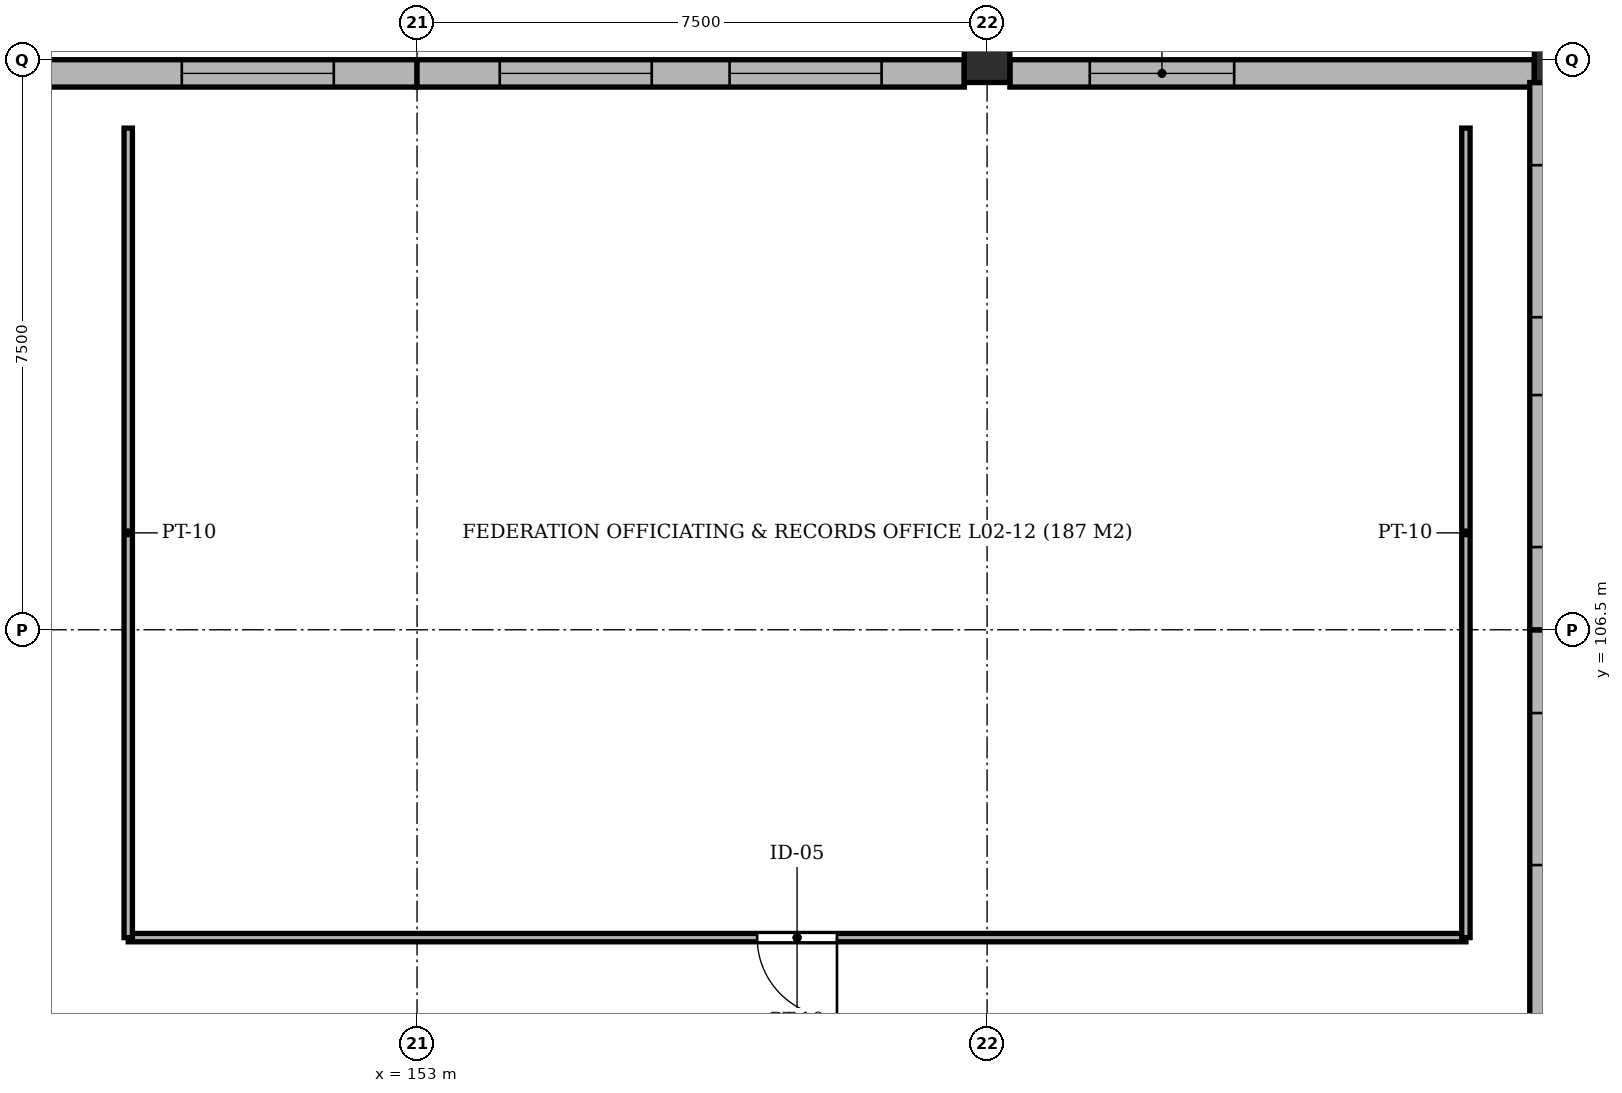
"""IFC4 building model, lengths in metres.
Left out: names, types, materials, properties, quantities, classifications, styles, units other than length and angle.
Written with IfcOpenShell. Run it as: python <this file> out.ifc"""

import sys

from ifc_helpers import new_model, si_unit, direction, frame, frame_2d, origin, origin_2d, place, context, subcontext, project, spatial, rectangle, extrude, element, fill, save


model = new_model("IFC4")
c1 = context("Model", 3, precision=1e-05, world=origin(), true_north=direction((0.0, 1.0)))
c2 = subcontext(c1, "Body", "Model", "MODEL_VIEW")
j1 = project(units=[si_unit("LENGTHUNIT", "METRE"), si_unit("PLANEANGLEUNIT", "RADIAN")], contexts=[c1])
p1 = place(None, origin())
s1 = spatial("IfcSite", under=j1, at=p1, CompositionType="ELEMENT")
p2 = place(p1, origin())
s2 = spatial("IfcBuilding", under=s1, at=p2, CompositionType="ELEMENT")
p3 = place(p2, frame((0.0, 0.0, 9.4)))
s3 = spatial("IfcBuildingStorey", under=s2, at=p3, CompositionType="ELEMENT", Elevation=9.4)
for number, where, z_axis, x_axis in (
    (1, (160.5, 114.0, -0.45), (0.0, 0.0, 1.0), (1.0, 0.0, 0.0)),
    (2, (168.0, 114.0, -0.45), (0.0, 0.0, 1.0), (1.0, 0.0, 0.0)),
):
    element("IfcColumn", number, at=place(p3, frame(where, z_axis=z_axis, x_axis=x_axis)), inside=s3, PredefinedType="COLUMN", context=c2, shape_type="SweptSolid", body=[
        extrude(rectangle(XDim=0.6, YDim=0.6, at=origin_2d()), origin(), (0.0, 0.0, 1.0), 4.77),
    ])
p4 = place(p3, frame((153.0, 113.82, 0.0), z_axis=(0.0, 0.0, 1.0), x_axis=(-1.0, 0.0, 0.0)))
e3 = element("IfcWall", 3, at=p4, inside=s3, PredefinedType="SOLIDWALL", context=c2, shape_type="SweptSolid", body=[
    extrude(rectangle(XDim=7.225, YDim=0.36, at=frame_2d((3.613, 0.0))), origin(), (0.0, 0.0, 1.0), 3.45),
])
p5 = place(p4, frame((1.095, 0.0, 0.92)))
e4 = element("IfcOpeningElement", 4, at=p5, cuts=e3, PredefinedType="OPENING", context=c2, shape_type="SweptSolid", body=[
    extrude(rectangle(XDim=2.0, YDim=2.1, at=frame_2d((1.0, 1.05))), frame((0.0, 0.192, 0.0), z_axis=(0.0, -1.0, 0.0), x_axis=(1.0, 0.0, 0.0)), (0.0, 0.0, 1.0), 0.384),
])
p6 = place(p3, frame((160.2, 113.82, 0.0), z_axis=(0.0, 0.0, 1.0), x_axis=(-1.0, 0.0, 0.0)))
e5 = element("IfcWall", 5, at=p6, inside=s3, PredefinedType="SOLIDWALL", context=c2, shape_type="SweptSolid", body=[
    extrude(rectangle(XDim=7.2, YDim=0.36, at=frame_2d((3.6, 0.0))), origin(), (0.0, 0.0, 1.0), 3.45),
])
p7 = place(p6, frame((4.112, 0.0, 0.92)))
e6 = element("IfcOpeningElement", 6, at=p7, cuts=e5, PredefinedType="OPENING", context=c2, shape_type="SweptSolid", body=[
    extrude(rectangle(XDim=2.0, YDim=2.1, at=frame_2d((1.0, 1.05))), frame((0.0, 0.192, 0.0), z_axis=(0.0, -1.0, 0.0), x_axis=(1.0, 0.0, 0.0)), (0.0, 0.0, 1.0), 0.384),
])
p8 = place(p6, frame((1.088, 0.0, 0.92)))
e7 = element("IfcOpeningElement", 7, at=p8, cuts=e5, PredefinedType="OPENING", context=c2, shape_type="SweptSolid", body=[
    extrude(rectangle(XDim=2.0, YDim=2.1, at=frame_2d((1.0, 1.05))), frame((0.0, 0.192, 0.0), z_axis=(0.0, -1.0, 0.0), x_axis=(1.0, 0.0, 0.0)), (0.0, 0.0, 1.0), 0.384),
])
p9 = place(p3, frame((167.7, 113.82, 0.0), z_axis=(0.0, 0.0, 1.0), x_axis=(-1.0, 0.0, 0.0)))
e8 = element("IfcWall", 8, at=p9, inside=s3, PredefinedType="SOLIDWALL", context=c2, shape_type="SweptSolid", body=[
    extrude(rectangle(XDim=6.9, YDim=0.36, at=frame_2d((3.45, 0.0))), origin(), (0.0, 0.0, 1.0), 3.82),
])
p10 = place(p9, frame((3.949, 0.0, 0.92)))
e9 = element("IfcOpeningElement", 9, at=p10, cuts=e8, PredefinedType="OPENING", context=c2, shape_type="SweptSolid", body=[
    extrude(rectangle(XDim=1.9, YDim=2.1, at=frame_2d((0.95, 1.05))), frame((0.0, 0.192, 0.0), z_axis=(0.0, -1.0, 0.0), x_axis=(1.0, 0.0, 0.0)), (0.0, 0.0, 1.0), 0.384),
])
p11 = place(p3, frame((167.82, 99.275, 0.0), z_axis=(0.0, 0.0, 1.0), x_axis=(0.0, 1.0, 0.0)))
e10 = element("IfcWall", 10, at=p11, inside=s3, PredefinedType="SOLIDWALL", context=c2, shape_type="SweptSolid", body=[
    extrude(rectangle(XDim=7.225, YDim=0.36, at=frame_2d((3.613, 0.0))), origin(), (0.0, 0.0, 1.0), 3.45),
])
p12 = place(p11, frame((4.13, 0.0, 0.92)))
e11 = element("IfcOpeningElement", 11, at=p12, cuts=e10, PredefinedType="OPENING", context=c2, shape_type="SweptSolid", body=[
    extrude(rectangle(XDim=2.0, YDim=2.1, at=frame_2d((1.0, 1.05))), frame((0.0, 0.192, 0.0), z_axis=(0.0, -1.0, 0.0), x_axis=(1.0, 0.0, 0.0)), (0.0, 0.0, 1.0), 0.384),
])
p13 = place(p3, frame((167.82, 106.5, 0.0), z_axis=(0.0, 0.0, 1.0), x_axis=(0.0, 1.0, 0.0)))
e12 = element("IfcWall", 12, at=p13, inside=s3, PredefinedType="SOLIDWALL", context=c2, shape_type="SweptSolid", body=[
    extrude(rectangle(XDim=7.2, YDim=0.36, at=frame_2d((3.6, 0.0))), origin(), (0.0, 0.0, 1.0), 3.45),
])
p14 = place(p13, frame((1.088, 0.0, 0.92)))
e13 = element("IfcOpeningElement", 13, at=p14, cuts=e12, PredefinedType="OPENING", context=c2, shape_type="SweptSolid", body=[
    extrude(rectangle(XDim=2.0, YDim=2.1, at=frame_2d((1.0, 1.05))), frame((0.0, 0.192, 0.0), z_axis=(0.0, -1.0, 0.0), x_axis=(1.0, 0.0, 0.0)), (0.0, 0.0, 1.0), 0.384),
])
p15 = place(p13, frame((4.112, 0.0, 0.92)))
e14 = element("IfcOpeningElement", 14, at=p15, cuts=e12, PredefinedType="OPENING", context=c2, shape_type="SweptSolid", body=[
    extrude(rectangle(XDim=2.0, YDim=2.1, at=frame_2d((1.0, 1.05))), frame((0.0, 0.192, 0.0), z_axis=(0.0, -1.0, 0.0), x_axis=(1.0, 0.0, 0.0)), (0.0, 0.0, 1.0), 0.384),
])
p16 = place(p3, frame((149.2, 102.45, 0.0), z_axis=(0.0, 0.0, 1.0), x_axis=(1.0, 0.0, 0.0)))
e15 = element("IfcWall", 15, at=p16, inside=s3, PredefinedType="PARTITIONING", context=c2, shape_type="SweptSolid", body=[
    extrude(rectangle(XDim=17.6, YDim=0.11, at=frame_2d((8.8, 0.0))), origin(), (0.0, 0.0, 1.0), 3.88),
])
p17 = place(p16, frame((8.275, 0.0, 0.0)))
e16 = element("IfcOpeningElement", 16, at=p17, cuts=e15, PredefinedType="OPENING", context=c2, shape_type="SweptSolid", body=[
    extrude(rectangle(XDim=1.05, YDim=2.15, at=frame_2d((0.525, 1.075))), frame((0.0, 0.067, 0.0), z_axis=(0.0, -1.0, 0.0), x_axis=(1.0, 0.0, 0.0)), (0.0, 0.0, 1.0), 0.134),
])
for number, where, z_axis, x_axis in (
    (17, (149.2, 102.45, 0.0), (0.0, 0.0, 1.0), (0.0, 1.0, 0.0)),
    (18, (166.8, 102.45, 0.0), (0.0, 0.0, 1.0), (0.0, 1.0, 0.0)),
):
    element("IfcWall", number, at=place(p3, frame(where, z_axis=z_axis, x_axis=x_axis)), inside=s3, PredefinedType="PARTITIONING", context=c2, shape_type="SweptSolid", body=[
        extrude(rectangle(XDim=10.65, YDim=0.11, at=frame_2d((5.325, 0.0))), origin(), (0.0, 0.0, 1.0), 3.88),
    ])
p18 = place(p5, origin())
e19 = element("IfcWindow", 19, at=p18, inside=s3, PartitioningType="SINGLE_PANEL", PredefinedType="WINDOW", context=c2, shape_type="SweptSolid", body=[
    extrude(rectangle(XDim=2.0, YDim=2.1, at=frame_2d((1.0, 1.05))), frame((0.0, 0.03, 0.0), z_axis=(0.0, -1.0, 0.0), x_axis=(1.0, 0.0, 0.0)), (0.0, 0.0, 1.0), 0.06),
])
fill(e4, e19)
p19 = place(p7, origin())
e20 = element("IfcWindow", 20, at=p19, inside=s3, PartitioningType="SINGLE_PANEL", PredefinedType="WINDOW", context=c2, shape_type="SweptSolid", body=[
    extrude(rectangle(XDim=2.0, YDim=2.1, at=frame_2d((1.0, 1.05))), frame((0.0, 0.03, 0.0), z_axis=(0.0, -1.0, 0.0), x_axis=(1.0, 0.0, 0.0)), (0.0, 0.0, 1.0), 0.06),
])
fill(e6, e20)
p20 = place(p8, origin())
e21 = element("IfcWindow", 21, at=p20, inside=s3, PartitioningType="SINGLE_PANEL", PredefinedType="WINDOW", context=c2, shape_type="SweptSolid", body=[
    extrude(rectangle(XDim=2.0, YDim=2.1, at=frame_2d((1.0, 1.05))), frame((0.0, 0.03, 0.0), z_axis=(0.0, -1.0, 0.0), x_axis=(1.0, 0.0, 0.0)), (0.0, 0.0, 1.0), 0.06),
])
fill(e7, e21)
p21 = place(p10, origin())
e22 = element("IfcWindow", 22, at=p21, inside=s3, PartitioningType="SINGLE_PANEL", PredefinedType="WINDOW", context=c2, shape_type="SweptSolid", body=[
    extrude(rectangle(XDim=1.9, YDim=2.1, at=frame_2d((0.95, 1.05))), frame((0.0, 0.03, 0.0), z_axis=(0.0, -1.0, 0.0), x_axis=(1.0, 0.0, 0.0)), (0.0, 0.0, 1.0), 0.06),
])
fill(e9, e22)
p22 = place(p12, origin())
e23 = element("IfcWindow", 23, at=p22, inside=s3, PartitioningType="SINGLE_PANEL", PredefinedType="WINDOW", context=c2, shape_type="SweptSolid", body=[
    extrude(rectangle(XDim=2.0, YDim=2.1, at=frame_2d((1.0, 1.05))), frame((0.0, 0.03, 0.0), z_axis=(0.0, -1.0, 0.0), x_axis=(1.0, 0.0, 0.0)), (0.0, 0.0, 1.0), 0.06),
])
fill(e11, e23)
p23 = place(p14, origin())
e24 = element("IfcWindow", 24, at=p23, inside=s3, PartitioningType="SINGLE_PANEL", PredefinedType="WINDOW", context=c2, shape_type="SweptSolid", body=[
    extrude(rectangle(XDim=2.0, YDim=2.1, at=frame_2d((1.0, 1.05))), frame((0.0, 0.03, 0.0), z_axis=(0.0, -1.0, 0.0), x_axis=(1.0, 0.0, 0.0)), (0.0, 0.0, 1.0), 0.06),
])
fill(e13, e24)
p24 = place(p15, origin())
e25 = element("IfcWindow", 25, at=p24, inside=s3, PartitioningType="SINGLE_PANEL", PredefinedType="WINDOW", context=c2, shape_type="SweptSolid", body=[
    extrude(rectangle(XDim=2.0, YDim=2.1, at=frame_2d((1.0, 1.05))), frame((0.0, 0.03, 0.0), z_axis=(0.0, -1.0, 0.0), x_axis=(1.0, 0.0, 0.0)), (0.0, 0.0, 1.0), 0.06),
])
fill(e14, e25)
p25 = place(p17, frame((1.05, 0.0, 0.0), z_axis=(0.0, 0.0, 1.0), x_axis=(-1.0, 0.0, 0.0)))
e26 = element("IfcDoor", 26, at=p25, inside=s3, OperationType="SINGLE_SWING_RIGHT", PredefinedType="DOOR", context=c2, shape_type="SweptSolid", body=[
    extrude(rectangle(XDim=1.05, YDim=2.15, at=frame_2d((0.525, 1.075))), frame((0.0, 0.025, 0.0), z_axis=(0.0, -1.0, 0.0), x_axis=(1.0, 0.0, 0.0)), (0.0, 0.0, 1.0), 0.05),
])
fill(e16, e26)
save(model, sys.argv[1])
